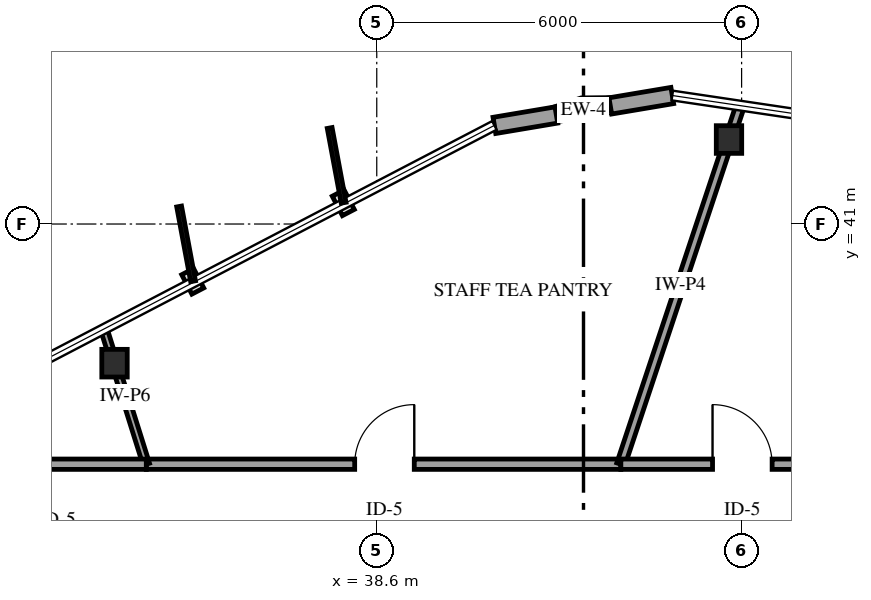
"""IFC4 building model, lengths in metres.
Left out: names, types, materials, properties, quantities, classifications, styles, units other than length and angle.
Written with IfcOpenShell. Run it as: python <this file> out.ifc"""

import sys

from ifc_helpers import new_model, si_unit, direction, frame, frame_2d, origin, origin_2d, place, context, subcontext, project, spatial, rectangle, i_section, extrude, element, fill, save


model = new_model("IFC4")
c1 = context("Model", 3, precision=1e-05, world=origin(), true_north=direction((0.0, 1.0)))
c2 = subcontext(c1, "Body", "Model", "MODEL_VIEW")
j1 = project(units=[si_unit("LENGTHUNIT", "METRE"), si_unit("PLANEANGLEUNIT", "RADIAN")], contexts=[c1])
p1 = place(None, origin())
s1 = spatial("IfcSite", under=j1, at=p1, CompositionType="ELEMENT")
p2 = place(p1, origin())
s2 = spatial("IfcBuilding", under=s1, at=p2, CompositionType="ELEMENT")
p3 = place(p2, frame((0.0, 0.0, 134.2)))
s3 = spatial("IfcBuildingStorey", under=s2, at=p3, CompositionType="ELEMENT", Elevation=134.2)
for number, where, z_axis, x_axis in (
    (1, (44.393, 42.389, 0.0), (0.0, 0.0, 1.0), (1.0, 0.0, 0.0)),
    (2, (34.288, 38.711, 0.0), (0.0, 0.0, 1.0), (1.0, 0.0, 0.0)),
):
    element("IfcColumn", number, at=place(p3, frame(where, z_axis=z_axis, x_axis=x_axis)), inside=s3, PredefinedType="COLUMN", context=c2, shape_type="SweptSolid", body=[
        extrude(i_section(OverallWidth=0.418, OverallDepth=0.455, WebThickness=0.042, FlangeThickness=0.068, FilletRadius=0.038, at=origin_2d()), origin(), (0.0, 0.0, 1.0), 4.5),
    ])
p4 = place(p3, frame((43.46, 43.113, 0.0), z_axis=(0.0, 0.0, 1.0), x_axis=(-0.986168353547, -0.165746729871, 0.0)))
e3 = element("IfcWall", 3, at=p4, inside=s3, PredefinedType="SOLIDWALL", context=c2, shape_type="SweptSolid", body=[
    extrude(rectangle(XDim=2.967, YDim=0.27, at=frame_2d((1.483, 0.0))), origin(), (0.0, 0.0, 1.0), 3.879),
])
p5 = place(p4, frame((1.033, 0.0, 0.75)))
e4 = element("IfcOpeningElement", 4, at=p5, cuts=e3, PredefinedType="OPENING", context=c2, shape_type="SweptSolid", body=[
    extrude(rectangle(XDim=0.9, YDim=1.5, at=frame_2d((0.45, 0.75))), frame((0.0, 0.145, 0.0), z_axis=(0.0, -1.0, 0.0), x_axis=(1.0, 0.0, 0.0)), (0.0, 0.0, 1.0), 0.29),
])
p6 = place(p3, frame((34.81, 37.05, 0.0), z_axis=(0.0, 0.0, 1.0), x_axis=(1.0, 0.0, 0.0)))
e5 = element("IfcWall", 5, at=p6, inside=s3, PredefinedType="PARTITIONING", context=c2, shape_type="SweptSolid", body=[
    extrude(rectangle(XDim=7.804, YDim=0.17, at=frame_2d((3.902, 0.0))), origin(), (0.0, 0.0, 1.0), 4.5),
])
p7 = place(p6, frame((3.427, 0.0, 0.0)))
e6 = element("IfcOpeningElement", 6, at=p7, cuts=e5, PredefinedType="OPENING", context=c2, shape_type="SweptSolid", body=[
    extrude(rectangle(XDim=0.98, YDim=2.15, at=frame_2d((0.49, 1.075))), frame((0.0, 0.095, 0.0), z_axis=(0.0, -1.0, 0.0), x_axis=(1.0, 0.0, 0.0)), (0.0, 0.0, 1.0), 0.19),
])
p8 = place(p3, frame((42.614, 37.05, 0.0), z_axis=(0.0, 0.0, 1.0), x_axis=(0.315968506057, 0.948769678679, 0.0)))
e7 = element("IfcWall", 7, at=p8, inside=s3, PredefinedType="PARTITIONING", context=c2, shape_type="SweptSolid", body=[
    extrude(rectangle(XDim=6.215, YDim=0.14, at=frame_2d((3.108, 0.0))), origin(), (0.0, 0.0, 1.0), 2.79),
])
p9 = place(p3, frame((42.614, 37.05, 0.0), z_axis=(0.0, 0.0, 1.0), x_axis=(1.0, 0.0, 0.0)))
e8 = element("IfcWall", 8, at=p9, inside=s3, PredefinedType="PARTITIONING", context=c2, shape_type="SweptSolid", body=[
    extrude(rectangle(XDim=3.966, YDim=0.17, at=frame_2d((1.983, 0.0))), origin(), (0.0, 0.0, 1.0), 4.5),
])
p10 = place(p9, frame((1.508, 0.0, 0.0)))
e9 = element("IfcOpeningElement", 9, at=p10, cuts=e8, PredefinedType="OPENING", context=c2, shape_type="SweptSolid", body=[
    extrude(rectangle(XDim=0.98, YDim=2.15, at=frame_2d((0.49, 1.075))), frame((0.0, 0.095, 0.0), z_axis=(0.0, -1.0, 0.0), x_axis=(1.0, 0.0, 0.0)), (0.0, 0.0, 1.0), 0.19),
])
p11 = place(p3, frame((34.81, 37.05, 0.0), z_axis=(0.0, 0.0, 1.0), x_axis=(-0.300082780879, 0.953913164088, 0.0)))
e10 = element("IfcWall", 10, at=p11, inside=s3, PredefinedType="PARTITIONING", context=c2, shape_type="SweptSolid", body=[
    extrude(rectangle(XDim=2.329, YDim=0.11, at=frame_2d((1.165, 0.0))), origin(), (0.0, 0.0, 1.0), 2.79),
])
p12 = place(p3, frame((32.67, 37.05, 0.0), z_axis=(0.0, 0.0, 1.0), x_axis=(1.0, 0.0, 0.0)))
e11 = element("IfcWall", 11, at=p12, inside=s3, PredefinedType="PARTITIONING", context=c2, shape_type="SweptSolid", body=[
    extrude(rectangle(XDim=2.14, YDim=0.17, at=frame_2d((1.07, 0.0))), origin(), (0.0, 0.0, 1.0), 4.5),
])
p13 = place(p5, origin())
e12 = element("IfcWindow", 12, at=p13, inside=s3, PartitioningType="SINGLE_PANEL", PredefinedType="WINDOW", context=c2, shape_type="SweptSolid", body=[
    extrude(rectangle(XDim=0.9, YDim=1.5, at=frame_2d((0.45, 0.75))), frame((0.0, 0.03, 0.0), z_axis=(0.0, -1.0, 0.0), x_axis=(1.0, 0.0, 0.0)), (0.0, 0.0, 1.0), 0.06),
])
fill(e4, e12)
p14 = place(p7, origin())
e13 = element("IfcDoor", 13, at=p14, inside=s3, OperationType="SINGLE_SWING_RIGHT", PredefinedType="DOOR", context=c2, shape_type="SweptSolid", body=[
    extrude(rectangle(XDim=0.98, YDim=2.15, at=frame_2d((0.49, 1.075))), frame((0.0, 0.025, 0.0), z_axis=(0.0, -1.0, 0.0), x_axis=(1.0, 0.0, 0.0)), (0.0, 0.0, 1.0), 0.05),
])
fill(e6, e13)
p15 = place(p10, origin())
e14 = element("IfcDoor", 14, at=p15, inside=s3, OperationType="SINGLE_SWING_LEFT", PredefinedType="DOOR", context=c2, shape_type="SweptSolid", body=[
    extrude(rectangle(XDim=0.98, YDim=2.15, at=frame_2d((0.49, 1.075))), frame((0.0, 0.025, 0.0), z_axis=(0.0, -1.0, 0.0), x_axis=(1.0, 0.0, 0.0)), (0.0, 0.0, 1.0), 0.05),
])
fill(e9, e14)
save(model, sys.argv[1])
